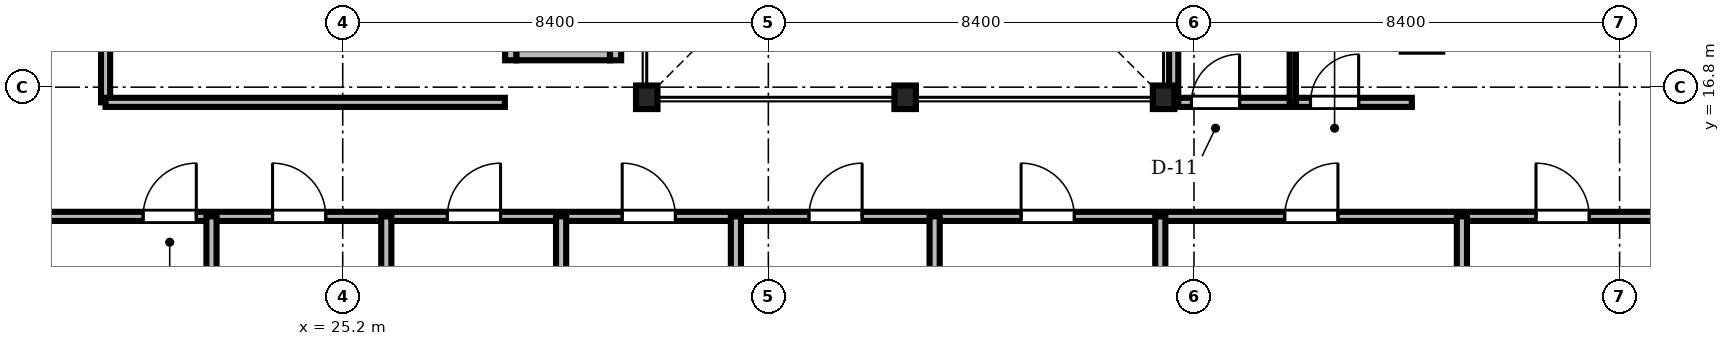
"""IFC4 building model, lengths in metres.
Left out: names, types, materials, properties, quantities, classifications, styles, units other than length and angle.
Written with IfcOpenShell. Run it as: python <this file> out.ifc"""

import sys

from ifc_helpers import new_model, si_unit, direction, frame, frame_2d, origin, origin_2d, place, context, subcontext, project, spatial, rectangle, i_section, extrude, source, transform, mapped, element, fill, save


model = new_model("IFC4")
c1 = context("Model", 3, precision=1e-05, world=origin(), true_north=direction((0.0, 1.0)))
c2 = subcontext(c1, "Body", "Model", "MODEL_VIEW")
j1 = project(units=[si_unit("LENGTHUNIT", "METRE"), si_unit("PLANEANGLEUNIT", "RADIAN")], contexts=[c1])
p1 = place(None, origin())
s1 = spatial("IfcSite", under=j1, at=p1, CompositionType="ELEMENT")
p2 = place(p1, origin())
s2 = spatial("IfcBuilding", under=s1, at=p2, CompositionType="ELEMENT")
p3 = place(p2, frame((0.0, 0.0, 133.5)))
s3 = spatial("IfcBuildingStorey", under=s2, at=p3, CompositionType="ELEMENT", Elevation=133.5)
m1 = source(origin(), c2, "Body", "SweptSolid", [
    extrude(i_section(OverallWidth=0.424, OverallDepth=0.465, WebThickness=0.035, FlangeThickness=0.056, FilletRadius=0.015, at=origin_2d()), origin(), (0.0, 0.0, 1.0), 3.46),
])
for number, where, z_axis, x_axis in (
    (1, (31.2, 16.6, 0.0), (0.0, 0.0, 1.0), (1.0, 0.0, 0.0)),
    (2, (36.3, 16.6, 0.0), (0.0, 0.0, 1.0), (1.0, 0.0, 0.0)),
    (3, (41.4, 16.6, 0.0), (0.0, 0.0, 1.0), (1.0, 0.0, 0.0)),
):
    element("IfcColumn", number, at=place(p3, frame(where, z_axis=z_axis, x_axis=x_axis)), inside=s3, PredefinedType="COLUMN", context=c2, shape_type="MappedRepresentation", body=[
        mapped(m1, transform((0.0, 0.0, 0.0), scale=1.0)),
    ])
m2 = source(origin(), c2, "Body", "SweptSolid", [
    extrude(rectangle(XDim=1.85, YDim=0.22, at=frame_2d((0.925, 0.0))), origin(), (0.0, 0.0, 1.0), 3.46),
])
p4 = place(p3, frame((28.625, 17.44, 0.0), z_axis=(0.0, 0.0, 1.0), x_axis=(1.0, 0.0, 0.0)))
e4 = element("IfcWall", 4, at=p4, inside=s3, PredefinedType="SOLIDWALL", context=c2, shape_type="MappedRepresentation", body=[
    mapped(m2, transform((0.0, 0.0, 0.0), scale=1.0)),
])
m3 = source(origin(), c2, "Body", "SweptSolid", [
    extrude(rectangle(XDim=2.54, YDim=0.22, at=frame_2d((1.27, 0.0))), origin(), (0.0, 0.0, 1.0), 3.46),
])
for number, where, z_axis, x_axis in (
    (5, (28.515, 17.33, 0.0), (0.0, 0.0, 1.0), (0.0, 1.0, 0.0)),
    (6, (30.585, 17.33, 0.0), (0.0, 0.0, 1.0), (0.0, 1.0, 0.0)),
):
    element("IfcWall", number, at=place(p3, frame(where, z_axis=z_axis, x_axis=x_axis)), inside=s3, PredefinedType="SOLIDWALL", context=c2, shape_type="MappedRepresentation", body=[
        mapped(m3, transform((0.0, 0.0, 0.0), scale=1.0)),
    ])
m4 = source(origin(), c2, "Body", "SweptSolid", [
    extrude(rectangle(XDim=46.156, YDim=0.18, at=frame_2d((23.078, 0.0))), origin(), (0.0, 0.0, 1.0), 2.702),
])
p5 = place(p3, frame((6.922, 14.25, 0.0), z_axis=(0.0, 0.0, 1.0), x_axis=(1.0, 0.0, 0.0)))
e7 = element("IfcWall", 7, at=p5, inside=s3, PredefinedType="PARTITIONING", context=c2, shape_type="MappedRepresentation", body=[
    mapped(m4, transform((0.0, 0.0, 0.0), scale=1.0)),
])
m5 = source(origin(), c2, "Body", "SweptSolid", [
    extrude(rectangle(XDim=1.05, YDim=2.2, at=frame_2d((0.525, 1.1))), frame((0.0, 0.1, 0.0), z_axis=(0.0, -1.0, 0.0), x_axis=(1.0, 0.0, 0.0)), (0.0, 0.0, 1.0), 0.2),
])
p6 = place(p5, frame((14.338, 0.0, 0.0)))
e8 = element("IfcOpeningElement", 8, at=p6, cuts=e7, PredefinedType="OPENING", context=c2, shape_type="MappedRepresentation", body=[
    mapped(m5, transform((0.0, 0.0, 0.0), scale=1.0)),
])
p7 = place(p5, frame((16.893, 0.0, 0.0)))
e9 = element("IfcOpeningElement", 9, at=p7, cuts=e7, PredefinedType="OPENING", context=c2, shape_type="MappedRepresentation", body=[
    mapped(m5, transform((0.0, 0.0, 0.0), scale=1.0)),
])
p8 = place(p5, frame((20.344, 0.0, 0.0)))
e10 = element("IfcOpeningElement", 10, at=p8, cuts=e7, PredefinedType="OPENING", context=c2, shape_type="MappedRepresentation", body=[
    mapped(m5, transform((0.0, 0.0, 0.0), scale=1.0)),
])
p9 = place(p5, frame((23.793, 0.0, 0.0)))
e11 = element("IfcOpeningElement", 11, at=p9, cuts=e7, PredefinedType="OPENING", context=c2, shape_type="MappedRepresentation", body=[
    mapped(m5, transform((0.0, 0.0, 0.0), scale=1.0)),
])
p10 = place(p5, frame((27.479, 0.0, 0.0)))
e12 = element("IfcOpeningElement", 12, at=p10, cuts=e7, PredefinedType="OPENING", context=c2, shape_type="MappedRepresentation", body=[
    mapped(m5, transform((0.0, 0.0, 0.0), scale=1.0)),
])
p11 = place(p5, frame((31.666, 0.0, 0.0)))
e13 = element("IfcOpeningElement", 13, at=p11, cuts=e7, PredefinedType="OPENING", context=c2, shape_type="MappedRepresentation", body=[
    mapped(m5, transform((0.0, 0.0, 0.0), scale=1.0)),
])
p12 = place(p5, frame((36.869, 0.0, 0.0)))
e14 = element("IfcOpeningElement", 14, at=p12, cuts=e7, PredefinedType="OPENING", context=c2, shape_type="MappedRepresentation", body=[
    mapped(m5, transform((0.0, 0.0, 0.0), scale=1.0)),
])
p13 = place(p5, frame((41.828, 0.0, 0.0)))
e15 = element("IfcOpeningElement", 15, at=p13, cuts=e7, PredefinedType="OPENING", context=c2, shape_type="MappedRepresentation", body=[
    mapped(m5, transform((0.0, 0.0, 0.0), scale=1.0)),
])
m6 = source(origin(), c2, "Body", "SweptSolid", [
    extrude(rectangle(XDim=5.4, YDim=0.18, at=frame_2d((2.7, 0.0))), origin(), (0.0, 0.0, 1.0), 2.852),
])
p14 = place(p3, frame((20.52, 16.5, 0.0), z_axis=(0.0, 0.0, 1.0), x_axis=(0.0, 1.0, 0.0)))
e16 = element("IfcWall", 16, at=p14, inside=s3, PredefinedType="PARTITIONING", context=c2, shape_type="MappedRepresentation", body=[
    mapped(m6, transform((0.0, 0.0, 0.0), scale=1.0)),
])
p15 = place(p14, frame((2.0, 0.0, 0.0)))
e17 = element("IfcOpeningElement", 17, at=p15, cuts=e16, PredefinedType="OPENING", context=c2, shape_type="MappedRepresentation", body=[
    mapped(m5, transform((0.0, 0.0, 0.0), scale=1.0)),
])
m7 = source(origin(), c2, "Body", "SweptSolid", [
    extrude(rectangle(XDim=4.7, YDim=0.18, at=frame_2d((2.35, 0.0))), origin(), (0.0, 0.0, 1.0), 2.852),
])
p16 = place(p3, frame((41.6, 16.5, 0.0), z_axis=(0.0, 0.0, 1.0), x_axis=(1.0, 0.0, 0.0)))
e18 = element("IfcWall", 18, at=p16, inside=s3, PredefinedType="PARTITIONING", context=c2, shape_type="MappedRepresentation", body=[
    mapped(m7, transform((0.0, 0.0, 0.0), scale=1.0)),
])
m8 = source(origin(), c2, "Body", "SweptSolid", [
    extrude(rectangle(XDim=0.95, YDim=2.15, at=frame_2d((0.475, 1.075))), frame((0.0, 0.1, 0.0), z_axis=(0.0, -1.0, 0.0), x_axis=(1.0, 0.0, 0.0)), (0.0, 0.0, 1.0), 0.2),
])
p17 = place(p16, frame((0.35, 0.0, 0.0)))
e19 = element("IfcOpeningElement", 19, at=p17, cuts=e18, PredefinedType="OPENING", context=c2, shape_type="MappedRepresentation", body=[
    mapped(m8, transform((0.0, 0.0, 0.0), scale=1.0)),
])
p18 = place(p16, frame((2.7, 0.0, 0.0)))
e20 = element("IfcOpeningElement", 20, at=p18, cuts=e18, PredefinedType="OPENING", context=c2, shape_type="MappedRepresentation", body=[
    mapped(m8, transform((0.0, 0.0, 0.0), scale=1.0)),
])
m9 = source(origin(), c2, "Body", "SweptSolid", [
    extrude(rectangle(XDim=12.128, YDim=0.2, at=frame_2d((6.064, 0.0))), origin(), (0.0, 0.0, 1.0), 2.702),
])
for number, where, z_axis, x_axis in (
    (21, (22.61, 2.122, 0.0), (0.0, 0.0, 1.0), (0.0, 1.0, 0.0)),
    (22, (26.06, 2.122, 0.0), (0.0, 0.0, 1.0), (0.0, 1.0, 0.0)),
):
    element("IfcWall", number, at=place(p3, frame(where, z_axis=z_axis, x_axis=x_axis)), inside=s3, PredefinedType="PARTITIONING", context=c2, shape_type="MappedRepresentation", body=[
        mapped(m9, transform((0.0, 0.0, 0.0), scale=1.0)),
    ])
m10 = source(origin(), c2, "Body", "SweptSolid", [
    extrude(rectangle(XDim=12.32, YDim=0.2, at=frame_2d((6.16, 0.0))), origin(), (0.0, 0.0, 1.0), 2.702),
])
for number, where, z_axis, x_axis in (
    (23, (29.51, 1.93, 0.0), (0.0, 0.0, 1.0), (0.0, 1.0, 0.0)),
    (24, (32.96, 1.93, 0.0), (0.0, 0.0, 1.0), (0.0, 1.0, 0.0)),
):
    element("IfcWall", number, at=place(p3, frame(where, z_axis=z_axis, x_axis=x_axis)), inside=s3, PredefinedType="PARTITIONING", context=c2, shape_type="MappedRepresentation", body=[
        mapped(m10, transform((0.0, 0.0, 0.0), scale=1.0)),
    ])
for number, where, z_axis, x_axis in (
    (25, (36.882, 2.122, 0.0), (0.0, 0.0, 1.0), (0.0, 1.0, 0.0)),
    (26, (41.335, 2.122, 0.0), (0.0, 0.0, 1.0), (0.0, 1.0, 0.0)),
    (27, (47.288, 2.122, 0.0), (0.0, 0.0, 1.0), (0.0, 1.0, 0.0)),
):
    element("IfcWall", number, at=place(p3, frame(where, z_axis=z_axis, x_axis=x_axis)), inside=s3, PredefinedType="PARTITIONING", context=c2, shape_type="MappedRepresentation", body=[
        mapped(m9, transform((0.0, 0.0, 0.0), scale=1.0)),
    ])
m11 = source(origin(), c2, "Body", "SweptSolid", [
    extrude(rectangle(XDim=7.88, YDim=0.18, at=frame_2d((3.94, 0.0))), origin(), (0.0, 0.0, 1.0), 3.46),
])
p19 = place(p3, frame((20.52, 16.5, 0.0), z_axis=(0.0, 0.0, 1.0), x_axis=(1.0, 0.0, 0.0)))
e28 = element("IfcWall", 28, at=p19, inside=s3, PredefinedType="PARTITIONING", context=c2, shape_type="MappedRepresentation", body=[
    mapped(m11, transform((0.0, 0.0, 0.0), scale=1.0)),
])
m12 = source(origin(), c2, "Body", "SweptSolid", [
    extrude(rectangle(XDim=7.15, YDim=0.18, at=frame_2d((3.575, 0.0))), origin(), (0.0, 0.0, 1.0), 2.852),
])
p20 = place(p3, frame((41.6, 16.5, 0.0), z_axis=(0.0, 0.0, 1.0), x_axis=(0.0, 1.0, 0.0)))
e29 = element("IfcWall", 29, at=p20, inside=s3, PredefinedType="PARTITIONING", context=c2, shape_type="MappedRepresentation", body=[
    mapped(m12, transform((0.0, 0.0, 0.0), scale=1.0)),
])
m13 = source(origin(), c2, "Body", "SweptSolid", [
    extrude(rectangle(XDim=7.15, YDim=0.125, at=frame_2d((3.575, 0.0))), origin(), (0.0, 0.0, 1.0), 2.852),
])
p21 = place(p3, frame((43.95, 16.5, 0.0), z_axis=(0.0, 0.0, 1.0), x_axis=(0.0, 1.0, 0.0)))
e30 = element("IfcWall", 30, at=p21, inside=s3, PredefinedType="PARTITIONING", context=c2, shape_type="MappedRepresentation", body=[
    mapped(m13, transform((0.0, 0.0, 0.0), scale=1.0)),
])
m14 = source(origin(), c2, "Body", "SweptSolid", [
    extrude(rectangle(XDim=1.05, YDim=2.2, at=frame_2d((0.525, 1.1))), frame((0.0, 0.025, 0.0), z_axis=(0.0, -1.0, 0.0), x_axis=(1.0, 0.0, 0.0)), (0.0, 0.0, 1.0), 0.05),
])
p22 = place(p6, origin())
e31 = element("IfcDoor", 31, at=p22, inside=s3, OperationType="SINGLE_SWING_RIGHT", PredefinedType="DOOR", context=c2, shape_type="MappedRepresentation", body=[
    mapped(m14, transform((0.0, 0.0, 0.0), scale=1.0)),
])
fill(e8, e31)
p23 = place(p7, origin())
e32 = element("IfcDoor", 32, at=p23, inside=s3, OperationType="SINGLE_SWING_LEFT", PredefinedType="DOOR", context=c2, shape_type="MappedRepresentation", body=[
    mapped(m14, transform((0.0, 0.0, 0.0), scale=1.0)),
])
fill(e9, e32)
p24 = place(p8, origin())
e33 = element("IfcDoor", 33, at=p24, inside=s3, OperationType="SINGLE_SWING_RIGHT", PredefinedType="DOOR", context=c2, shape_type="MappedRepresentation", body=[
    mapped(m14, transform((0.0, 0.0, 0.0), scale=1.0)),
])
fill(e10, e33)
p25 = place(p9, origin())
e34 = element("IfcDoor", 34, at=p25, inside=s3, OperationType="SINGLE_SWING_LEFT", PredefinedType="DOOR", context=c2, shape_type="MappedRepresentation", body=[
    mapped(m14, transform((0.0, 0.0, 0.0), scale=1.0)),
])
fill(e11, e34)
p26 = place(p10, origin())
e35 = element("IfcDoor", 35, at=p26, inside=s3, OperationType="SINGLE_SWING_RIGHT", PredefinedType="DOOR", context=c2, shape_type="MappedRepresentation", body=[
    mapped(m14, transform((0.0, 0.0, 0.0), scale=1.0)),
])
fill(e12, e35)
p27 = place(p11, origin())
e36 = element("IfcDoor", 36, at=p27, inside=s3, OperationType="SINGLE_SWING_LEFT", PredefinedType="DOOR", context=c2, shape_type="MappedRepresentation", body=[
    mapped(m14, transform((0.0, 0.0, 0.0), scale=1.0)),
])
fill(e13, e36)
p28 = place(p12, origin())
e37 = element("IfcDoor", 37, at=p28, inside=s3, OperationType="SINGLE_SWING_RIGHT", PredefinedType="DOOR", context=c2, shape_type="MappedRepresentation", body=[
    mapped(m14, transform((0.0, 0.0, 0.0), scale=1.0)),
])
fill(e14, e37)
p29 = place(p13, origin())
e38 = element("IfcDoor", 38, at=p29, inside=s3, OperationType="SINGLE_SWING_LEFT", PredefinedType="DOOR", context=c2, shape_type="MappedRepresentation", body=[
    mapped(m14, transform((0.0, 0.0, 0.0), scale=1.0)),
])
fill(e15, e38)
m15 = source(origin(), c2, "Body", "SweptSolid", [
    extrude(rectangle(XDim=0.95, YDim=2.15, at=frame_2d((0.475, 1.075))), frame((0.0, 0.025, 0.0), z_axis=(0.0, -1.0, 0.0), x_axis=(1.0, 0.0, 0.0)), (0.0, 0.0, 1.0), 0.05),
])
p30 = place(p17, origin())
e39 = element("IfcDoor", 39, at=p30, inside=s3, OperationType="SINGLE_SWING_RIGHT", PredefinedType="DOOR", context=c2, shape_type="MappedRepresentation", body=[
    mapped(m15, transform((0.0, 0.0, 0.0), scale=1.0)),
])
fill(e19, e39)
p31 = place(p18, origin())
e40 = element("IfcDoor", 40, at=p31, inside=s3, OperationType="SINGLE_SWING_RIGHT", PredefinedType="DOOR", context=c2, shape_type="MappedRepresentation", body=[
    mapped(m15, transform((0.0, 0.0, 0.0), scale=1.0)),
])
fill(e20, e40)
save(model, sys.argv[1])
